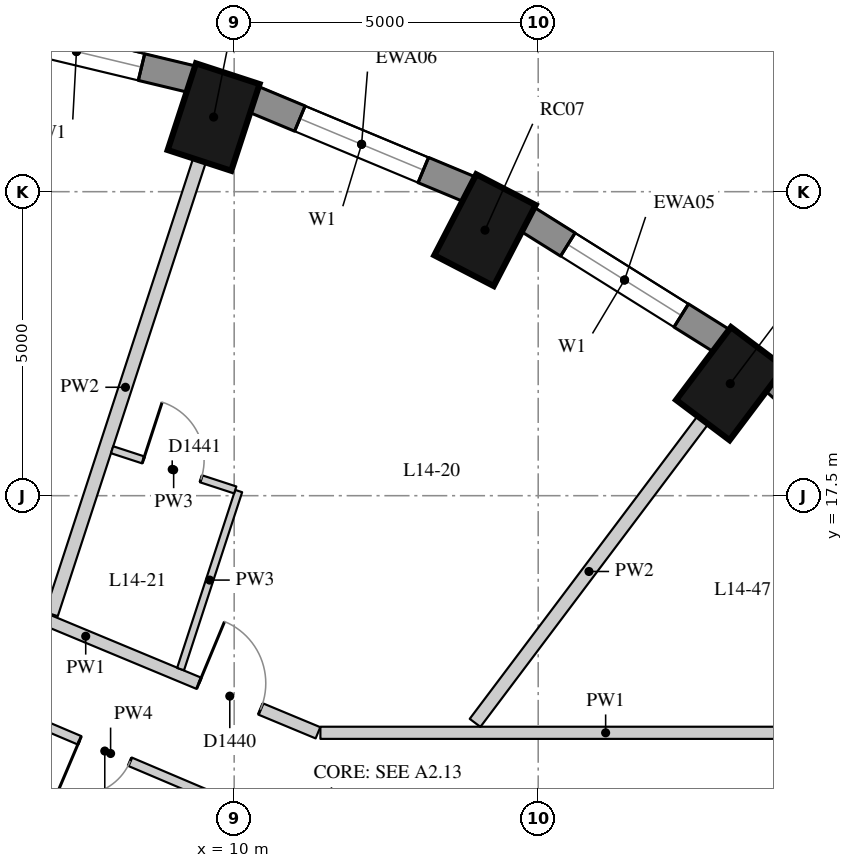
"""IFC4 building model, lengths in metres.
Left out: names, types, materials, properties, quantities, classifications, styles, units other than length and angle.
Written with IfcOpenShell. Run it as: python <this file> out.ifc"""

import sys

from ifc_helpers import new_model, si_unit, direction, frame, frame_2d, origin, origin_2d, place, context, subcontext, project, spatial, rectangle, extrude, element, fill, save


model = new_model("IFC4")
c1 = context("Model", 3, precision=1e-05, world=origin(), true_north=direction((0.0, 1.0)))
c2 = subcontext(c1, "Body", "Model", "MODEL_VIEW")
j1 = project(units=[si_unit("LENGTHUNIT", "METRE"), si_unit("PLANEANGLEUNIT", "RADIAN")], contexts=[c1])
p1 = place(None, origin())
s1 = spatial("IfcSite", under=j1, at=p1, CompositionType="ELEMENT")
p2 = place(p1, origin())
s2 = spatial("IfcBuilding", under=s1, at=p2, CompositionType="ELEMENT")
p3 = place(p2, frame((0.0, 0.0, 54.7)))
s3 = spatial("IfcBuildingStorey", under=s2, at=p3, CompositionType="ELEMENT", Elevation=54.7)
for number, where, z_axis, x_axis in (
    (1, (18.159, 19.343, 0.0), (0.0, 0.0, 1.0), (0.601, 0.799, 0.0)),
    (2, (14.125, 21.867, 0.0), (0.0, 0.0, 1.0), (0.46, 0.888, 0.0)),
    (3, (9.662, 23.727, 0.0), (0.0, 0.0, 1.0), (0.31, 0.951, 0.0)),
):
    element("IfcColumn", number, at=place(p3, frame(where, z_axis=z_axis, x_axis=x_axis)), inside=s3, PredefinedType="COLUMN", context=c2, shape_type="SweptSolid", body=[
        extrude(rectangle(XDim=1.5, YDim=1.1, at=origin_2d()), origin(), (0.0, 0.0, 1.0), 3.3),
    ])
p4 = place(p3, frame((21.627, 16.943, 0.0), z_axis=(0.0, 0.0, 1.0), x_axis=(-0.745526233716, 0.66647628228, 0.0)))
e4 = element("IfcWall", 4, at=p4, inside=s3, PredefinedType="SOLIDWALL", context=c2, shape_type="SweptSolid", body=[
    extrude(rectangle(XDim=3.697, YDim=0.45, at=frame_2d((1.848, 0.0))), origin(), (0.0, 0.0, 1.0), 3.02),
])
p5 = place(p3, frame((18.023, 20.044, 0.0), z_axis=(0.0, 0.0, 1.0), x_axis=(-0.847635480093, 0.530579016629, 0.0)))
e5 = element("IfcWall", 5, at=p5, inside=s3, PredefinedType="SOLIDWALL", context=c2, shape_type="SweptSolid", body=[
    extrude(rectangle(XDim=3.782, YDim=0.45, at=frame_2d((1.891, 0.0))), origin(), (0.0, 0.0, 1.0), 3.02),
])
p6 = place(p5, frame((0.791, 0.0, 0.4)))
e6 = element("IfcOpeningElement", 6, at=p6, cuts=e5, PredefinedType="OPENING", context=c2, shape_type="SweptSolid", body=[
    extrude(rectangle(XDim=2.2, YDim=1.75, at=frame_2d((1.1, 0.875))), frame((0.0, 0.235, 0.0), z_axis=(0.0, -1.0, 0.0), x_axis=(1.0, 0.0, 0.0)), (0.0, 0.0, 1.0), 0.47),
])
p7 = place(p3, frame((13.875, 22.537, 0.0), z_axis=(0.0, 0.0, 1.0), x_axis=(-0.923031964282, 0.384723267966, 0.0)))
e7 = element("IfcWall", 7, at=p7, inside=s3, PredefinedType="SOLIDWALL", context=c2, shape_type="SweptSolid", body=[
    extrude(rectangle(XDim=3.856, YDim=0.45, at=frame_2d((1.928, 0.0))), origin(), (0.0, 0.0, 1.0), 3.02),
])
p8 = place(p7, frame((0.828, 0.0, 0.4)))
e8 = element("IfcOpeningElement", 8, at=p8, cuts=e7, PredefinedType="OPENING", context=c2, shape_type="SweptSolid", body=[
    extrude(rectangle(XDim=2.2, YDim=1.75, at=frame_2d((1.1, 0.875))), frame((0.0, 0.235, 0.0), z_axis=(0.0, -1.0, 0.0), x_axis=(1.0, 0.0, 0.0)), (0.0, 0.0, 1.0), 0.47),
])
p9 = place(p3, frame((9.308, 24.35, 0.0), z_axis=(0.0, 0.0, 1.0), x_axis=(-0.972496561493, 0.232917233979, 0.0)))
e9 = element("IfcWall", 9, at=p9, inside=s3, PredefinedType="SOLIDWALL", context=c2, shape_type="SweptSolid", body=[
    extrude(rectangle(XDim=3.911, YDim=0.45, at=frame_2d((1.956, 0.0))), origin(), (0.0, 0.0, 1.0), 3.02),
])
p10 = place(p9, frame((0.855, 0.0, 0.4)))
e10 = element("IfcOpeningElement", 10, at=p10, cuts=e9, PredefinedType="OPENING", context=c2, shape_type="SweptSolid", body=[
    extrude(rectangle(XDim=2.2, YDim=1.75, at=frame_2d((1.1, 0.875))), frame((0.0, 0.235, 0.0), z_axis=(0.0, -1.0, 0.0), x_axis=(1.0, 0.0, 0.0)), (0.0, 0.0, 1.0), 0.47),
])
p11 = place(p3, frame((3.739, 16.776, 0.0), z_axis=(0.0, 0.0, 1.0), x_axis=(0.923364778497, -0.383923802117, 0.0)))
e11 = element("IfcWall", 11, at=p11, inside=s3, PredefinedType="PARTITIONING", context=c2, shape_type="SweptSolid", body=[
    extrude(rectangle(XDim=8.273, YDim=0.2, at=frame_2d((4.137, 0.0))), origin(), (0.0, 0.0, 1.0), 3.02),
])
p12 = place(p11, frame((6.153, 0.0, 0.0)))
e12 = element("IfcOpeningElement", 12, at=p12, cuts=e11, PredefinedType="OPENING", context=c2, shape_type="SweptSolid", body=[
    extrude(rectangle(XDim=1.1, YDim=2.1, at=frame_2d((0.55, 1.05))), frame((0.0, 0.11, 0.0), z_axis=(0.0, -1.0, 0.0), x_axis=(1.0, 0.0, 0.0)), (0.0, 0.0, 1.0), 0.22),
])
p13 = place(p11, frame((1.298, 0.0, 0.0)))
e13 = element("IfcOpeningElement", 13, at=p13, cuts=e11, PredefinedType="OPENING", context=c2, shape_type="SweptSolid", body=[
    extrude(rectangle(XDim=0.9, YDim=2.1, at=frame_2d((0.45, 1.05))), frame((0.0, 0.11, 0.0), z_axis=(0.0, -1.0, 0.0), x_axis=(1.0, 0.0, 0.0)), (0.0, 0.0, 1.0), 0.22),
])
p14 = place(p3, frame((11.418, 13.6, 0.0), z_axis=(0.0, 0.0, 1.0), x_axis=(1.0, 0.0, 0.0)))
e14 = element("IfcWall", 14, at=p14, inside=s3, PredefinedType="PARTITIONING", context=c2, shape_type="SweptSolid", body=[
    extrude(rectangle(XDim=9.382, YDim=0.2, at=frame_2d((4.691, 0.0))), origin(), (0.0, 0.0, 1.0), 3.02),
])
p15 = place(p3, frame((5.149, 14.456, 0.0), z_axis=(0.0, 0.0, 1.0), x_axis=(0.920541383735, -0.390645057348, 0.0)))
e15 = element("IfcWall", 15, at=p15, inside=s3, PredefinedType="PARTITIONING", context=c2, shape_type="SweptSolid", body=[
    extrude(rectangle(XDim=6.124, YDim=0.15, at=frame_2d((3.062, 0.0))), origin(), (0.0, 0.0, 1.0), 3.02),
])
p16 = place(p15, frame((2.508, 0.0, 0.0)))
e16 = element("IfcOpeningElement", 16, at=p16, cuts=e15, PredefinedType="OPENING", context=c2, shape_type="SweptSolid", body=[
    extrude(rectangle(XDim=0.9, YDim=2.1, at=frame_2d((0.45, 1.05))), frame((0.0, 0.085, 0.0), z_axis=(0.0, -1.0, 0.0), x_axis=(1.0, 0.0, 0.0)), (0.0, 0.0, 1.0), 0.17),
])
p17 = place(p3, frame((17.708, 18.743, 0.0), z_axis=(0.0, 0.0, 1.0), x_axis=(-0.601177883261, -0.799115231164, 0.0)))
e17 = element("IfcWall", 17, at=p17, inside=s3, PredefinedType="PARTITIONING", context=c2, shape_type="SweptSolid", body=[
    extrude(rectangle(XDim=6.231, YDim=0.22, at=frame_2d((3.116, 0.0))), origin(), (0.0, 0.0, 1.0), 3.02),
])
p18 = place(p3, frame((9.429, 23.014, 0.0), z_axis=(0.0, 0.0, 1.0), x_axis=(-0.310230839568, -0.950661257326, 0.0)))
e18 = element("IfcWall", 18, at=p18, inside=s3, PredefinedType="PARTITIONING", context=c2, shape_type="SweptSolid", body=[
    extrude(rectangle(XDim=7.849, YDim=0.22, at=frame_2d((3.925, 0.0))), origin(), (0.0, 0.0, 1.0), 3.02),
])
p19 = place(p3, frame((9.118, 14.648, 0.0), z_axis=(0.0, 0.0, 1.0), x_axis=(0.310277544614, 0.950646014723, 0.0)))
e19 = element("IfcWall", 19, at=p19, inside=s3, PredefinedType="PARTITIONING", context=c2, shape_type="SweptSolid", body=[
    extrude(rectangle(XDim=3.081, YDim=0.12, at=frame_2d((1.54, 0.0))), origin(), (0.0, 0.0, 1.0), 3.02),
])
p20 = place(p3, frame((10.017, 17.594, 0.0), z_axis=(0.0, 0.0, 1.0), x_axis=(-0.950613738429, 0.310376417129, 0.0)))
e20 = element("IfcWall", 20, at=p20, inside=s3, PredefinedType="PARTITIONING", context=c2, shape_type="SweptSolid", body=[
    extrude(rectangle(XDim=2.13, YDim=0.12, at=frame_2d((1.065, 0.0))), origin(), (0.0, 0.0, 1.0), 3.02),
])
p21 = place(p20, frame((0.59, 0.0, 0.0)))
e21 = element("IfcOpeningElement", 21, at=p21, cuts=e20, PredefinedType="OPENING", context=c2, shape_type="SweptSolid", body=[
    extrude(rectangle(XDim=1.0, YDim=2.1, at=frame_2d((0.5, 1.05))), frame((0.0, 0.07, 0.0), z_axis=(0.0, -1.0, 0.0), x_axis=(1.0, 0.0, 0.0)), (0.0, 0.0, 1.0), 0.14),
])
p22 = place(p6, origin())
e22 = element("IfcWindow", 22, at=p22, inside=s3, PartitioningType="SINGLE_PANEL", PredefinedType="WINDOW", context=c2, shape_type="SweptSolid", body=[
    extrude(rectangle(XDim=2.2, YDim=1.75, at=frame_2d((1.1, 0.875))), frame((0.0, 0.035, 0.0), z_axis=(0.0, -1.0, 0.0), x_axis=(1.0, 0.0, 0.0)), (0.0, 0.0, 1.0), 0.06),
])
fill(e6, e22)
p23 = place(p8, origin())
e23 = element("IfcWindow", 23, at=p23, inside=s3, PartitioningType="SINGLE_PANEL", PredefinedType="WINDOW", context=c2, shape_type="SweptSolid", body=[
    extrude(rectangle(XDim=2.2, YDim=1.75, at=frame_2d((1.1, 0.875))), frame((0.0, 0.035, 0.0), z_axis=(0.0, -1.0, 0.0), x_axis=(1.0, 0.0, 0.0)), (0.0, 0.0, 1.0), 0.06),
])
fill(e8, e23)
p24 = place(p10, origin())
e24 = element("IfcWindow", 24, at=p24, inside=s3, PartitioningType="SINGLE_PANEL", PredefinedType="WINDOW", context=c2, shape_type="SweptSolid", body=[
    extrude(rectangle(XDim=2.2, YDim=1.75, at=frame_2d((1.1, 0.875))), frame((0.0, 0.035, 0.0), z_axis=(0.0, -1.0, 0.0), x_axis=(1.0, 0.0, 0.0)), (0.0, 0.0, 1.0), 0.06),
])
fill(e10, e24)
p25 = place(p12, origin())
e25 = element("IfcDoor", 25, at=p25, inside=s3, OperationType="SINGLE_SWING_LEFT", PredefinedType="DOOR", context=c2, shape_type="SweptSolid", body=[
    extrude(rectangle(XDim=1.1, YDim=2.1, at=frame_2d((0.55, 1.05))), frame((0.0, 0.025, 0.0), z_axis=(0.0, -1.0, 0.0), x_axis=(1.0, 0.0, 0.0)), (0.0, 0.0, 1.0), 0.05),
])
fill(e12, e25)
p26 = place(p21, origin())
e26 = element("IfcDoor", 26, at=p26, inside=s3, OperationType="SINGLE_SWING_LEFT", PredefinedType="DOOR", context=c2, shape_type="SweptSolid", body=[
    extrude(rectangle(XDim=1.0, YDim=2.1, at=frame_2d((0.5, 1.05))), frame((0.0, 0.025, 0.0), z_axis=(0.0, -1.0, 0.0), x_axis=(1.0, 0.0, 0.0)), (0.0, 0.0, 1.0), 0.05),
])
fill(e21, e26)
p27 = place(p16, origin())
e27 = element("IfcDoor", 27, at=p27, inside=s3, OperationType="SINGLE_SWING_RIGHT", PredefinedType="DOOR", context=c2, shape_type="SweptSolid", body=[
    extrude(rectangle(XDim=0.9, YDim=2.1, at=frame_2d((0.45, 1.05))), frame((0.0, 0.025, 0.0), z_axis=(0.0, -1.0, 0.0), x_axis=(1.0, 0.0, 0.0)), (0.0, 0.0, 1.0), 0.05),
])
fill(e16, e27)
save(model, sys.argv[1])
